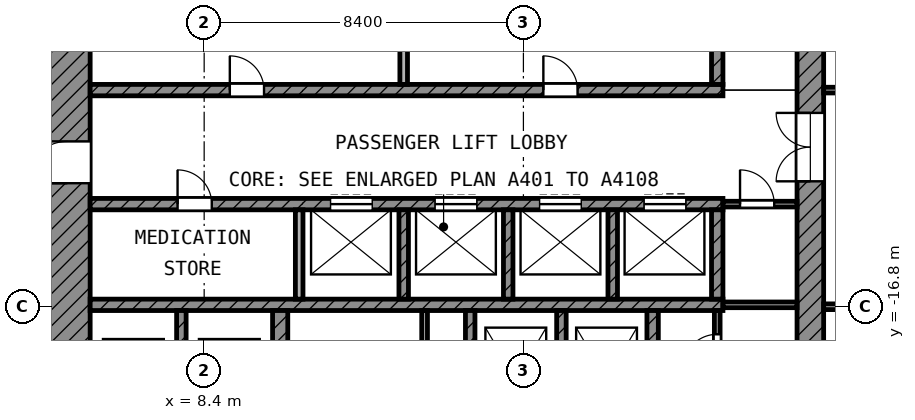
"""IFC4 building model, lengths in metres.
Left out: names, types, materials, properties, quantities, classifications, styles, units other than length and angle.
Written with IfcOpenShell. Run it as: python <this file> out.ifc"""

import sys

from ifc_helpers import new_model, si_unit, direction, frame, frame_2d, origin, place, context, subcontext, project, spatial, rectangle, extrude, element, fill, save


model = new_model("IFC4")
c1 = context("Model", 3, precision=1e-05, world=origin(), true_north=direction((0.0, 1.0)))
c2 = subcontext(c1, "Body", "Model", "MODEL_VIEW")
j1 = project(units=[si_unit("LENGTHUNIT", "METRE"), si_unit("PLANEANGLEUNIT", "RADIAN")], contexts=[c1])
p1 = place(None, origin())
s1 = spatial("IfcSite", under=j1, at=p1, CompositionType="ELEMENT")
p2 = place(p1, origin())
s2 = spatial("IfcBuilding", under=s1, at=p2, CompositionType="ELEMENT")
p3 = place(p2, frame((0.0, 0.0, 286.0)))
s3 = spatial("IfcBuildingStorey", under=s2, at=p3, CompositionType="ELEMENT", Elevation=286.0)
p4 = place(p3, frame((4.8, -24.7, 0.0), z_axis=(0.0, 0.0, 1.0), x_axis=(0.0, 1.0, 0.0)))
e1 = element("IfcWall", 1, at=p4, inside=s3, PredefinedType="SHEAR", context=c2, shape_type="SweptSolid", body=[
    extrude(rectangle(XDim=19.3, YDim=1.2, at=frame_2d((9.65, 0.0))), origin(), (0.0, 0.0, 1.0), 3.6),
])
p5 = place(p4, frame((11.15, 0.0, 0.0)))
e2 = element("IfcOpeningElement", 2, at=p5, cuts=e1, PredefinedType="OPENING", context=c2, shape_type="SweptSolid", body=[
    extrude(rectangle(XDim=1.1, YDim=2.1, at=frame_2d((0.55, 1.05))), frame((0.0, 0.61, 0.0), z_axis=(0.0, -1.0, 0.0), x_axis=(1.0, 0.0, 0.0)), (0.0, 0.0, 1.0), 1.22),
])
p6 = place(p4, frame((1.85, 0.0, 0.0)))
e3 = element("IfcOpeningElement", 3, at=p6, cuts=e1, PredefinedType="OPENING", context=c2, shape_type="SweptSolid", body=[
    extrude(rectangle(XDim=1.1, YDim=2.1, at=frame_2d((0.55, 1.05))), frame((0.0, 0.61, 0.0), z_axis=(0.0, -1.0, 0.0), x_axis=(1.0, 0.0, 0.0)), (0.0, 0.0, 1.0), 1.22),
])
p7 = place(p3, frame((24.35, -24.0, 0.0), z_axis=(0.0, 0.0, 1.0), x_axis=(0.0, 1.0, 0.0)))
e4 = element("IfcWall", 4, at=p7, inside=s3, PredefinedType="SHEAR", context=c2, shape_type="SweptSolid", body=[
    extrude(rectangle(XDim=18.6, YDim=0.7, at=frame_2d((9.3, 0.0))), origin(), (0.0, 0.0, 1.0), 3.6),
])
p8 = place(p7, frame((10.5, 0.0, 0.0)))
e5 = element("IfcOpeningElement", 5, at=p8, cuts=e4, PredefinedType="OPENING", context=c2, shape_type="SweptSolid", body=[
    extrude(rectangle(XDim=1.8, YDim=2.1, at=frame_2d((0.9, 1.05))), frame((0.0, 0.36, 0.0), z_axis=(0.0, -1.0, 0.0), x_axis=(1.0, 0.0, 0.0)), (0.0, 0.0, 1.0), 0.72),
])
p9 = place(p3, frame((5.4, -11.1, 0.0), z_axis=(0.0, 0.0, 1.0), x_axis=(1.0, 0.0, 0.0)))
e6 = element("IfcWall", 6, at=p9, inside=s3, PredefinedType="SHEAR", context=c2, shape_type="SweptSolid", body=[
    extrude(rectangle(XDim=16.65, YDim=0.3, at=frame_2d((8.325, 0.0))), origin(), (0.0, 0.0, 1.0), 3.6),
])
p10 = place(p9, frame((3.675, 0.0, 0.0)))
e7 = element("IfcOpeningElement", 7, at=p10, cuts=e6, PredefinedType="OPENING", context=c2, shape_type="SweptSolid", body=[
    extrude(rectangle(XDim=0.9, YDim=2.1, at=frame_2d((0.45, 1.05))), frame((0.0, 0.16, 0.0), z_axis=(0.0, -1.0, 0.0), x_axis=(1.0, 0.0, 0.0)), (0.0, 0.0, 1.0), 0.32),
])
p11 = place(p9, frame((11.925, 0.0, 0.0)))
e8 = element("IfcOpeningElement", 8, at=p11, cuts=e6, PredefinedType="OPENING", context=c2, shape_type="SweptSolid", body=[
    extrude(rectangle(XDim=0.9, YDim=2.1, at=frame_2d((0.45, 1.05))), frame((0.0, 0.16, 0.0), z_axis=(0.0, -1.0, 0.0), x_axis=(1.0, 0.0, 0.0)), (0.0, 0.0, 1.0), 0.32),
])
p12 = place(p3, frame((5.4, -14.1, 0.0), z_axis=(0.0, 0.0, 1.0), x_axis=(1.0, 0.0, 0.0)))
e9 = element("IfcWall", 9, at=p12, inside=s3, PredefinedType="SHEAR", context=c2, shape_type="SweptSolid", body=[
    extrude(rectangle(XDim=16.65, YDim=0.3, at=frame_2d((8.325, 0.0))), origin(), (0.0, 0.0, 1.0), 3.6),
])
p13 = place(p12, frame((6.325, 0.0, 0.0)))
e10 = element("IfcOpeningElement", 10, at=p13, cuts=e9, PredefinedType="OPENING", context=c2, shape_type="SweptSolid", body=[
    extrude(rectangle(XDim=1.1, YDim=2.1, at=frame_2d((0.55, 1.05))), frame((0.0, 0.16, 0.0), z_axis=(0.0, -1.0, 0.0), x_axis=(1.0, 0.0, 0.0)), (0.0, 0.0, 1.0), 0.32),
])
p14 = place(p12, frame((9.075, 0.0, 0.0)))
e11 = element("IfcOpeningElement", 11, at=p14, cuts=e9, PredefinedType="OPENING", context=c2, shape_type="SweptSolid", body=[
    extrude(rectangle(XDim=1.1, YDim=2.1, at=frame_2d((0.55, 1.05))), frame((0.0, 0.16, 0.0), z_axis=(0.0, -1.0, 0.0), x_axis=(1.0, 0.0, 0.0)), (0.0, 0.0, 1.0), 0.32),
])
p15 = place(p12, frame((11.825, 0.0, 0.0)))
e12 = element("IfcOpeningElement", 12, at=p15, cuts=e9, PredefinedType="OPENING", context=c2, shape_type="SweptSolid", body=[
    extrude(rectangle(XDim=1.1, YDim=2.1, at=frame_2d((0.55, 1.05))), frame((0.0, 0.16, 0.0), z_axis=(0.0, -1.0, 0.0), x_axis=(1.0, 0.0, 0.0)), (0.0, 0.0, 1.0), 0.32),
])
p16 = place(p12, frame((14.575, 0.0, 0.0)))
e13 = element("IfcOpeningElement", 13, at=p16, cuts=e9, PredefinedType="OPENING", context=c2, shape_type="SweptSolid", body=[
    extrude(rectangle(XDim=1.1, YDim=2.1, at=frame_2d((0.55, 1.05))), frame((0.0, 0.16, 0.0), z_axis=(0.0, -1.0, 0.0), x_axis=(1.0, 0.0, 0.0)), (0.0, 0.0, 1.0), 0.32),
])
p17 = place(p12, frame((2.3, 0.0, 0.0)))
e14 = element("IfcOpeningElement", 14, at=p17, cuts=e9, PredefinedType="OPENING", context=c2, shape_type="SweptSolid", body=[
    extrude(rectangle(XDim=0.9, YDim=2.1, at=frame_2d((0.45, 1.05))), frame((0.0, 0.16, 0.0), z_axis=(0.0, -1.0, 0.0), x_axis=(1.0, 0.0, 0.0)), (0.0, 0.0, 1.0), 0.32),
])
p18 = place(p3, frame((5.4, -16.75, 0.0), z_axis=(0.0, 0.0, 1.0), x_axis=(1.0, 0.0, 0.0)))
e15 = element("IfcWall", 15, at=p18, inside=s3, PredefinedType="SHEAR", context=c2, shape_type="SweptSolid", body=[
    extrude(rectangle(XDim=16.65, YDim=0.3, at=frame_2d((8.325, 0.0))), origin(), (0.0, 0.0, 1.0), 3.6),
])
p19 = place(p3, frame((10.4, -20.05, 0.0), z_axis=(0.0, 0.0, 1.0), x_axis=(0.0, 1.0, 0.0)))
e16 = element("IfcWall", 16, at=p19, inside=s3, PredefinedType="SHEAR", context=c2, shape_type="SweptSolid", body=[
    extrude(rectangle(XDim=3.15, YDim=0.4, at=frame_2d((1.575, 0.0))), origin(), (0.0, 0.0, 1.0), 3.6),
])
p20 = place(p3, frame((20.2, -20.35, 0.0), z_axis=(0.0, 0.0, 1.0), x_axis=(0.0, 1.0, 0.0)))
e17 = element("IfcWall", 17, at=p20, inside=s3, PredefinedType="SHEAR", context=c2, shape_type="SweptSolid", body=[
    extrude(rectangle(XDim=3.45, YDim=0.3, at=frame_2d((1.725, 0.0))), origin(), (0.0, 0.0, 1.0), 3.6),
])
p21 = place(p3, frame((21.9, -10.95, 0.0), z_axis=(0.0, 0.0, 1.0), x_axis=(0.0, 1.0, 0.0)))
e18 = element("IfcWall", 18, at=p21, inside=s3, PredefinedType="SHEAR", context=c2, shape_type="SweptSolid", body=[
    extrude(rectangle(XDim=2.35, YDim=0.3, at=frame_2d((1.175, 0.0))), origin(), (0.0, 0.0, 1.0), 3.6),
])
p22 = place(p3, frame((21.9, -16.6, 0.0), z_axis=(0.0, 0.0, 1.0), x_axis=(0.0, 1.0, 0.0)))
e19 = element("IfcWall", 19, at=p22, inside=s3, PredefinedType="SHEAR", context=c2, shape_type="SweptSolid", body=[
    extrude(rectangle(XDim=2.35, YDim=0.3, at=frame_2d((1.175, 0.0))), origin(), (0.0, 0.0, 1.0), 3.6),
])
for number, where, z_axis, x_axis in (
    (20, (7.8, -20.05, 0.0), (0.0, 0.0, 1.0), (0.0, 1.0, 0.0)),
    (21, (15.4, -20.05, 0.0), (0.0, 0.0, 1.0), (0.0, 1.0, 0.0)),
    (22, (17.8, -20.05, 0.0), (0.0, 0.0, 1.0), (0.0, 1.0, 0.0)),
):
    element("IfcWall", number, at=place(p3, frame(where, z_axis=z_axis, x_axis=x_axis)), inside=s3, PredefinedType="SHEAR", context=c2, shape_type="SweptSolid", body=[
        extrude(rectangle(XDim=3.15, YDim=0.25, at=frame_2d((1.575, 0.0))), origin(), (0.0, 0.0, 1.0), 3.6),
    ])
p23 = place(p3, frame((13.65, -10.95, 0.0), z_axis=(0.0, 0.0, 1.0), x_axis=(0.0, 1.0, 0.0)))
e23 = element("IfcWall", 23, at=p23, inside=s3, PredefinedType="PARTITIONING", context=c2, shape_type="SweptSolid", body=[
    extrude(rectangle(XDim=2.35, YDim=0.2, at=frame_2d((1.175, 0.0))), origin(), (0.0, 0.0, 1.0), 3.6),
])
p24 = place(p3, frame((10.9, -16.6, 0.0), z_axis=(0.0, 0.0, 1.0), x_axis=(0.0, 1.0, 0.0)))
e24 = element("IfcWall", 24, at=p24, inside=s3, PredefinedType="PARTITIONING", context=c2, shape_type="SweptSolid", body=[
    extrude(rectangle(XDim=2.35, YDim=0.2, at=frame_2d((1.175, 0.0))), origin(), (0.0, 0.0, 1.0), 3.6),
])
for number, where, z_axis, x_axis in (
    (25, (13.65, -16.6, 0.0), (0.0, 0.0, 1.0), (0.0, 1.0, 0.0)),
    (26, (16.4, -16.6, 0.0), (0.0, 0.0, 1.0), (0.0, 1.0, 0.0)),
    (27, (19.15, -16.6, 0.0), (0.0, 0.0, 1.0), (0.0, 1.0, 0.0)),
):
    element("IfcWall", number, at=place(p3, frame(where, z_axis=z_axis, x_axis=x_axis)), inside=s3, PredefinedType="SHEAR", context=c2, shape_type="SweptSolid", body=[
        extrude(rectangle(XDim=2.35, YDim=0.25, at=frame_2d((1.175, 0.0))), origin(), (0.0, 0.0, 1.0), 3.6),
    ])
p25 = place(p3, frame((21.9, -19.05, 0.0), z_axis=(0.0, 0.0, 1.0), x_axis=(0.0, 1.0, 0.0)))
e28 = element("IfcWall", 28, at=p25, inside=s3, PredefinedType="PARTITIONING", context=c2, shape_type="SweptSolid", body=[
    extrude(rectangle(XDim=2.15, YDim=0.15, at=frame_2d((1.075, 0.0))), origin(), (0.0, 0.0, 1.0), 3.6),
])
p26 = place(p25, frame((0.625, 0.0, 0.0)))
e29 = element("IfcOpeningElement", 29, at=p26, cuts=e28, PredefinedType="OPENING", context=c2, shape_type="SweptSolid", body=[
    extrude(rectangle(XDim=0.9, YDim=2.1, at=frame_2d((0.45, 1.05))), frame((0.0, 0.085, 0.0), z_axis=(0.0, -1.0, 0.0), x_axis=(1.0, 0.0, 0.0)), (0.0, 0.0, 1.0), 0.17),
])
p27 = place(p3, frame((22.05, -16.75, 0.0), z_axis=(0.0, 0.0, 1.0), x_axis=(1.0, 0.0, 0.0)))
e30 = element("IfcWall", 30, at=p27, inside=s3, PredefinedType="PARTITIONING", context=c2, shape_type="SweptSolid", body=[
    extrude(rectangle(XDim=1.95, YDim=0.15, at=frame_2d((0.975, 0.0))), origin(), (0.0, 0.0, 1.0), 3.6),
])
p28 = place(p3, frame((22.05, -14.1, 0.0), z_axis=(0.0, 0.0, 1.0), x_axis=(1.0, 0.0, 0.0)))
e31 = element("IfcWall", 31, at=p28, inside=s3, PredefinedType="PARTITIONING", context=c2, shape_type="SweptSolid", body=[
    extrude(rectangle(XDim=1.95, YDim=0.15, at=frame_2d((0.975, 0.0))), origin(), (0.0, 0.0, 1.0), 3.6),
])
p29 = place(p28, frame((0.45, 0.0, 0.0)))
e32 = element("IfcOpeningElement", 32, at=p29, cuts=e31, PredefinedType="OPENING", context=c2, shape_type="SweptSolid", body=[
    extrude(rectangle(XDim=0.9, YDim=2.1, at=frame_2d((0.45, 1.05))), frame((0.0, 0.085, 0.0), z_axis=(0.0, -1.0, 0.0), x_axis=(1.0, 0.0, 0.0)), (0.0, 0.0, 1.0), 0.17),
])
p30 = place(p3, frame((14.2, -20.05, 0.0), z_axis=(0.0, 0.0, 1.0), x_axis=(0.0, 1.0, 0.0)))
e33 = element("IfcWall", 33, at=p30, inside=s3, PredefinedType="PARTITIONING", context=c2, shape_type="SweptSolid", body=[
    extrude(rectangle(XDim=3.15, YDim=0.15, at=frame_2d((1.575, 0.0))), origin(), (0.0, 0.0, 1.0), 3.6),
])
p31 = place(p3, frame((24.7, -16.8, 0.0), z_axis=(0.0, 0.0, 1.0), x_axis=(1.0, 0.0, 0.0)))
e34 = element("IfcWall", 34, at=p31, inside=s3, PredefinedType="PARTITIONING", context=c2, shape_type="SweptSolid", body=[
    extrude(rectangle(XDim=8.82, YDim=0.15, at=frame_2d((4.41, 0.0))), origin(), (0.0, 0.0, 1.0), 3.6),
])
p32 = place(p31, frame((2.8, 0.0, 0.0)))
e35 = element("IfcOpeningElement", 35, at=p32, cuts=e34, PredefinedType="OPENING", context=c2, shape_type="SweptSolid", body=[
    extrude(rectangle(XDim=1.0, YDim=2.1, at=frame_2d((0.5, 1.05))), frame((0.0, 0.085, 0.0), z_axis=(0.0, -1.0, 0.0), x_axis=(1.0, 0.0, 0.0)), (0.0, 0.0, 1.0), 0.17),
])
p33 = place(p31, frame((1.4, 0.0, 0.0)))
e36 = element("IfcOpeningElement", 36, at=p33, cuts=e34, PredefinedType="OPENING", context=c2, shape_type="SweptSolid", body=[
    extrude(rectangle(XDim=1.0, YDim=2.1, at=frame_2d((0.5, 1.05))), frame((0.0, 0.085, 0.0), z_axis=(0.0, -1.0, 0.0), x_axis=(1.0, 0.0, 0.0)), (0.0, 0.0, 1.0), 0.17),
])
p34 = place(p31, frame((6.2, 0.0, 0.0)))
e37 = element("IfcOpeningElement", 37, at=p34, cuts=e34, PredefinedType="OPENING", context=c2, shape_type="SweptSolid", body=[
    extrude(rectangle(XDim=1.2, YDim=2.1, at=frame_2d((0.6, 1.05))), frame((0.0, 0.085, 0.0), z_axis=(0.0, -1.0, 0.0), x_axis=(1.0, 0.0, 0.0)), (0.0, 0.0, 1.0), 0.17),
])
p35 = place(p3, frame((24.7, -11.1, 0.0), z_axis=(0.0, 0.0, 1.0), x_axis=(1.0, 0.0, 0.0)))
e38 = element("IfcWall", 38, at=p35, inside=s3, PredefinedType="PARTITIONING", context=c2, shape_type="SweptSolid", body=[
    extrude(rectangle(XDim=4.625, YDim=0.15, at=frame_2d((2.312, 0.0))), origin(), (0.0, 0.0, 1.0), 3.6),
])
p36 = place(p35, frame((1.1, 0.0, 0.0)))
e39 = element("IfcOpeningElement", 39, at=p36, cuts=e38, PredefinedType="OPENING", context=c2, shape_type="SweptSolid", body=[
    extrude(rectangle(XDim=0.9, YDim=2.1, at=frame_2d((0.45, 1.05))), frame((0.0, 0.085, 0.0), z_axis=(0.0, -1.0, 0.0), x_axis=(1.0, 0.0, 0.0)), (0.0, 0.0, 1.0), 0.17),
])
p37 = place(p35, frame((3.15, 0.0, 0.0)))
e40 = element("IfcOpeningElement", 40, at=p37, cuts=e38, PredefinedType="OPENING", context=c2, shape_type="SweptSolid", body=[
    extrude(rectangle(XDim=1.0, YDim=2.1, at=frame_2d((0.5, 1.05))), frame((0.0, 0.085, 0.0), z_axis=(0.0, -1.0, 0.0), x_axis=(1.0, 0.0, 0.0)), (0.0, 0.0, 1.0), 0.17),
])
p38 = place(p13, origin())
e41 = element("IfcDoor", 41, at=p38, inside=s3, OperationType="DOUBLE_DOOR_SLIDING", PredefinedType="DOOR", context=c2, shape_type="SweptSolid", body=[
    extrude(rectangle(XDim=1.1, YDim=2.1, at=frame_2d((0.55, 1.05))), frame((0.0, 0.025, 0.0), z_axis=(0.0, -1.0, 0.0), x_axis=(1.0, 0.0, 0.0)), (0.0, 0.0, 1.0), 0.05),
])
fill(e10, e41)
p39 = place(p14, origin())
e42 = element("IfcDoor", 42, at=p39, inside=s3, OperationType="DOUBLE_DOOR_SLIDING", PredefinedType="DOOR", context=c2, shape_type="SweptSolid", body=[
    extrude(rectangle(XDim=1.1, YDim=2.1, at=frame_2d((0.55, 1.05))), frame((0.0, 0.025, 0.0), z_axis=(0.0, -1.0, 0.0), x_axis=(1.0, 0.0, 0.0)), (0.0, 0.0, 1.0), 0.05),
])
fill(e11, e42)
p40 = place(p15, origin())
e43 = element("IfcDoor", 43, at=p40, inside=s3, OperationType="DOUBLE_DOOR_SLIDING", PredefinedType="DOOR", context=c2, shape_type="SweptSolid", body=[
    extrude(rectangle(XDim=1.1, YDim=2.1, at=frame_2d((0.55, 1.05))), frame((0.0, 0.025, 0.0), z_axis=(0.0, -1.0, 0.0), x_axis=(1.0, 0.0, 0.0)), (0.0, 0.0, 1.0), 0.05),
])
fill(e12, e43)
p41 = place(p16, origin())
e44 = element("IfcDoor", 44, at=p41, inside=s3, OperationType="DOUBLE_DOOR_SLIDING", PredefinedType="DOOR", context=c2, shape_type="SweptSolid", body=[
    extrude(rectangle(XDim=1.1, YDim=2.1, at=frame_2d((0.55, 1.05))), frame((0.0, 0.025, 0.0), z_axis=(0.0, -1.0, 0.0), x_axis=(1.0, 0.0, 0.0)), (0.0, 0.0, 1.0), 0.05),
])
fill(e13, e44)
p42 = place(p5, origin())
e45 = element("IfcDoor", 45, at=p42, inside=s3, OperationType="SINGLE_SWING_LEFT", PredefinedType="DOOR", context=c2, shape_type="SweptSolid", body=[
    extrude(rectangle(XDim=1.1, YDim=2.1, at=frame_2d((0.55, 1.05))), frame((0.0, 0.025, 0.0), z_axis=(0.0, -1.0, 0.0), x_axis=(1.0, 0.0, 0.0)), (0.0, 0.0, 1.0), 0.05),
])
fill(e2, e45)
p43 = place(p8, origin())
e46 = element("IfcDoor", 46, at=p43, inside=s3, OperationType="DOUBLE_DOOR_SINGLE_SWING", PredefinedType="DOOR", context=c2, shape_type="SweptSolid", body=[
    extrude(rectangle(XDim=1.8, YDim=2.1, at=frame_2d((0.9, 1.05))), frame((0.0, 0.025, 0.0), z_axis=(0.0, -1.0, 0.0), x_axis=(1.0, 0.0, 0.0)), (0.0, 0.0, 1.0), 0.05),
])
fill(e5, e46)
p44 = place(p29, origin())
e47 = element("IfcDoor", 47, at=p44, inside=s3, OperationType="SINGLE_SWING_LEFT", PredefinedType="DOOR", context=c2, shape_type="SweptSolid", body=[
    extrude(rectangle(XDim=0.9, YDim=2.1, at=frame_2d((0.45, 1.05))), frame((0.0, 0.025, 0.0), z_axis=(0.0, -1.0, 0.0), x_axis=(1.0, 0.0, 0.0)), (0.0, 0.0, 1.0), 0.05),
])
fill(e32, e47)
p45 = place(p26, origin())
e48 = element("IfcDoor", 48, at=p45, inside=s3, OperationType="SINGLE_SWING_LEFT", PredefinedType="DOOR", context=c2, shape_type="SweptSolid", body=[
    extrude(rectangle(XDim=0.9, YDim=2.1, at=frame_2d((0.45, 1.05))), frame((0.0, 0.025, 0.0), z_axis=(0.0, -1.0, 0.0), x_axis=(1.0, 0.0, 0.0)), (0.0, 0.0, 1.0), 0.05),
])
fill(e29, e48)
p46 = place(p10, origin())
e49 = element("IfcDoor", 49, at=p46, inside=s3, OperationType="SINGLE_SWING_LEFT", PredefinedType="DOOR", context=c2, shape_type="SweptSolid", body=[
    extrude(rectangle(XDim=0.9, YDim=2.1, at=frame_2d((0.45, 1.05))), frame((0.0, 0.025, 0.0), z_axis=(0.0, -1.0, 0.0), x_axis=(1.0, 0.0, 0.0)), (0.0, 0.0, 1.0), 0.05),
])
fill(e7, e49)
p47 = place(p11, origin())
e50 = element("IfcDoor", 50, at=p47, inside=s3, OperationType="SINGLE_SWING_LEFT", PredefinedType="DOOR", context=c2, shape_type="SweptSolid", body=[
    extrude(rectangle(XDim=0.9, YDim=2.1, at=frame_2d((0.45, 1.05))), frame((0.0, 0.025, 0.0), z_axis=(0.0, -1.0, 0.0), x_axis=(1.0, 0.0, 0.0)), (0.0, 0.0, 1.0), 0.05),
])
fill(e8, e50)
p48 = place(p17, origin())
e51 = element("IfcDoor", 51, at=p48, inside=s3, OperationType="SINGLE_SWING_LEFT", PredefinedType="DOOR", context=c2, shape_type="SweptSolid", body=[
    extrude(rectangle(XDim=0.9, YDim=2.1, at=frame_2d((0.45, 1.05))), frame((0.0, 0.025, 0.0), z_axis=(0.0, -1.0, 0.0), x_axis=(1.0, 0.0, 0.0)), (0.0, 0.0, 1.0), 0.05),
])
fill(e14, e51)
save(model, sys.argv[1])
